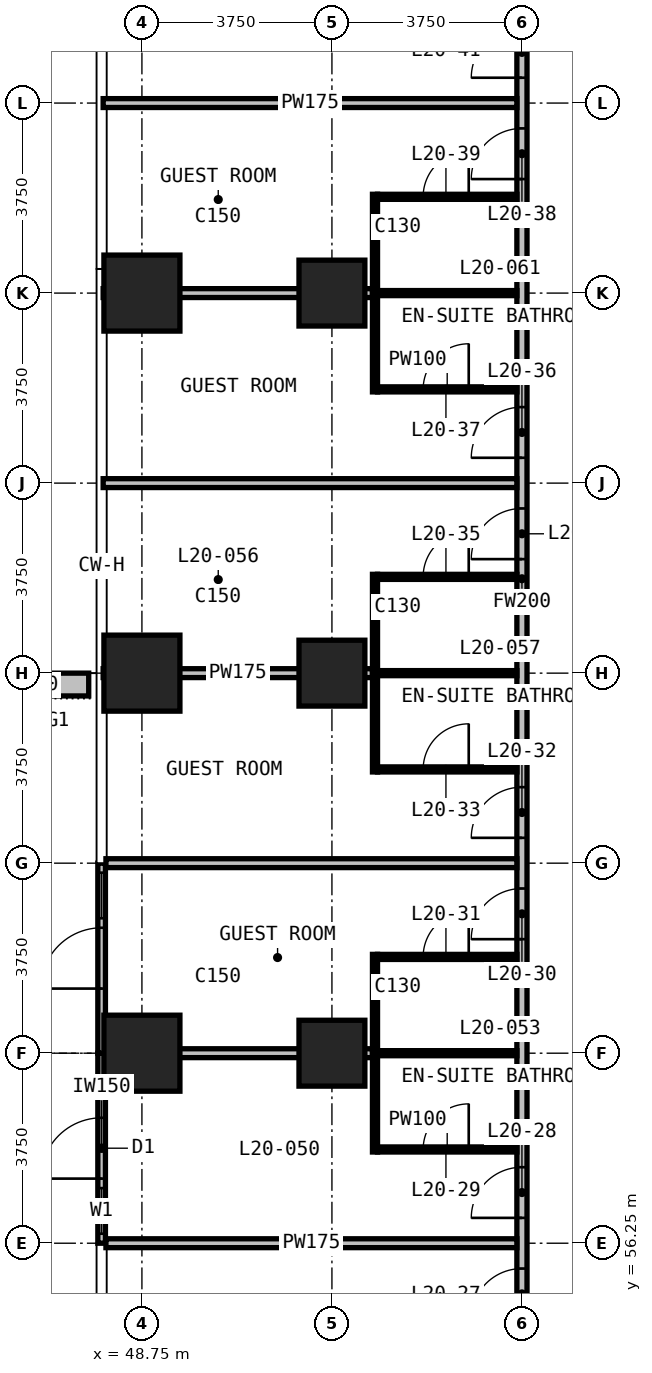
"""IFC4 building model, lengths in metres.
Left out: names, types, materials, properties, quantities, classifications, styles, units other than length and angle.
Written with IfcOpenShell. Run it as: python <this file> out.ifc"""

import sys

from ifc_helpers import new_model, si_unit, direction, frame, frame_2d, origin, origin_2d, place, context, subcontext, project, spatial, rectangle, extrude, element, fill, save


model = new_model("IFC4")
c1 = context("Model", 3, precision=1e-05, world=origin(), true_north=direction((0.0, 1.0)))
c2 = subcontext(c1, "Body", "Model", "MODEL_VIEW")
j1 = project(units=[si_unit("LENGTHUNIT", "METRE"), si_unit("PLANEANGLEUNIT", "RADIAN")], contexts=[c1])
p1 = place(None, origin())
s1 = spatial("IfcSite", under=j1, at=p1, CompositionType="ELEMENT")
p2 = place(p1, origin())
s2 = spatial("IfcBuilding", under=s1, at=p2, CompositionType="ELEMENT")
p3 = place(p2, frame((0.0, 0.0, 85.7)))
s3 = spatial("IfcBuildingStorey", under=s2, at=p3, CompositionType="ELEMENT", Elevation=85.7)
for number, where, z_axis, x_axis in (
    (1, (48.75, 60.0, 0.0), (0.0, 0.0, 1.0), (1.0, 0.0, 0.0)),
    (2, (48.75, 67.5, 0.0), (0.0, 0.0, 1.0), (1.0, 0.0, 0.0)),
    (3, (48.75, 75.0, 0.0), (0.0, 0.0, 1.0), (1.0, 0.0, 0.0)),
):
    element("IfcColumn", number, at=place(p3, frame(where, z_axis=z_axis, x_axis=x_axis)), inside=s3, PredefinedType="COLUMN", context=c2, shape_type="SweptSolid", body=[
        extrude(rectangle(XDim=1.5, YDim=1.5, at=origin_2d()), origin(), (0.0, 0.0, 1.0), 3.3),
    ])
for number, where, z_axis, x_axis in (
    (4, (52.5, 60.0, 0.0), (0.0, 0.0, 1.0), (1.0, 0.0, 0.0)),
    (5, (52.5, 67.5, 0.0), (0.0, 0.0, 1.0), (1.0, 0.0, 0.0)),
    (6, (52.5, 75.0, 0.0), (0.0, 0.0, 1.0), (1.0, 0.0, 0.0)),
):
    element("IfcColumn", number, at=place(p3, frame(where, z_axis=z_axis, x_axis=x_axis)), inside=s3, PredefinedType="COLUMN", context=c2, shape_type="SweptSolid", body=[
        extrude(rectangle(XDim=1.3, YDim=1.3, at=origin_2d()), origin(), (0.0, 0.0, 1.0), 3.3),
    ])
p4 = place(p3, frame((47.955, 56.25, 0.0), z_axis=(0.0, 0.0, 1.0), x_axis=(0.0, 1.0, 0.0)))
e7 = element("IfcWall", 7, at=p4, inside=s3, PredefinedType="SOLIDWALL", context=c2, shape_type="SweptSolid", body=[
    extrude(rectangle(XDim=3.75, YDim=0.15, at=frame_2d((1.875, 0.0))), origin(), (0.0, 0.0, 1.0), 3.0),
])
p5 = place(p4, frame((0.188, 0.0, 0.1)))
e8 = element("IfcOpeningElement", 8, at=p5, cuts=e7, PredefinedType="OPENING", context=c2, shape_type="SweptSolid", body=[
    extrude(rectangle(XDim=0.9, YDim=2.4, at=frame_2d((0.45, 1.2))), frame((0.0, 0.085, 0.0), z_axis=(0.0, -1.0, 0.0), x_axis=(1.0, 0.0, 0.0)), (0.0, 0.0, 1.0), 0.17),
])
p6 = place(p4, frame((1.275, 0.0, 0.0)))
e9 = element("IfcOpeningElement", 9, at=p6, cuts=e7, PredefinedType="OPENING", context=c2, shape_type="SweptSolid", body=[
    extrude(rectangle(XDim=1.2, YDim=2.4, at=frame_2d((0.6, 1.2))), frame((0.0, 0.085, 0.0), z_axis=(0.0, -1.0, 0.0), x_axis=(1.0, 0.0, 0.0)), (0.0, 0.0, 1.0), 0.17),
])
p7 = place(p3, frame((47.955, 60.0, 0.0), z_axis=(0.0, 0.0, 1.0), x_axis=(0.0, 1.0, 0.0)))
e10 = element("IfcWall", 10, at=p7, inside=s3, PredefinedType="SOLIDWALL", context=c2, shape_type="SweptSolid", body=[
    extrude(rectangle(XDim=3.75, YDim=0.15, at=frame_2d((1.875, 0.0))), origin(), (0.0, 0.0, 1.0), 3.0),
])
p8 = place(p7, frame((1.275, 0.0, 0.0)))
e11 = element("IfcOpeningElement", 11, at=p8, cuts=e10, PredefinedType="OPENING", context=c2, shape_type="SweptSolid", body=[
    extrude(rectangle(XDim=1.2, YDim=2.4, at=frame_2d((0.6, 1.2))), frame((0.0, 0.085, 0.0), z_axis=(0.0, -1.0, 0.0), x_axis=(1.0, 0.0, 0.0)), (0.0, 0.0, 1.0), 0.17),
])
p9 = place(p7, frame((2.663, 0.0, 0.1)))
e12 = element("IfcOpeningElement", 12, at=p9, cuts=e10, PredefinedType="OPENING", context=c2, shape_type="SweptSolid", body=[
    extrude(rectangle(XDim=0.9, YDim=2.4, at=frame_2d((0.45, 1.2))), frame((0.0, 0.085, 0.0), z_axis=(0.0, -1.0, 0.0), x_axis=(1.0, 0.0, 0.0)), (0.0, 0.0, 1.0), 0.17),
])
p10 = place(p3, frame((47.7, 67.275, 0.0), z_axis=(0.0, 0.0, 1.0), x_axis=(-1.0, 0.0, 0.0)))
e13 = element("IfcWall", 13, at=p10, inside=s3, PredefinedType="USERDEFINED", context=c2, shape_type="SweptSolid", body=[
    extrude(rectangle(XDim=2.35, YDim=0.45, at=frame_2d((1.175, 0.0))), origin(), (0.0, 0.0, 1.0), 1.1),
])
p11 = place(p3, frame((56.25, 52.4, 0.0), z_axis=(0.0, 0.0, 1.0), x_axis=(0.0, 1.0, 0.0)))
e14 = element("IfcWall", 14, at=p11, inside=s3, PredefinedType="PARTITIONING", context=c2, shape_type="SweptSolid", body=[
    extrude(rectangle(XDim=33.925, YDim=0.2, at=frame_2d((16.962, 0.0))), origin(), (0.0, 0.0, 1.0), 3.0),
])
p12 = place(p11, frame((2.35, 0.0, 0.0)))
e15 = element("IfcOpeningElement", 15, at=p12, cuts=e14, PredefinedType="OPENING", context=c2, shape_type="SweptSolid", body=[
    extrude(rectangle(XDim=1.0, YDim=2.2, at=frame_2d((0.5, 1.1))), frame((0.0, 0.11, 0.0), z_axis=(0.0, -1.0, 0.0), x_axis=(1.0, 0.0, 0.0)), (0.0, 0.0, 1.0), 0.22),
])
p13 = place(p11, frame((4.35, 0.0, 0.0)))
e16 = element("IfcOpeningElement", 16, at=p13, cuts=e14, PredefinedType="OPENING", context=c2, shape_type="SweptSolid", body=[
    extrude(rectangle(XDim=1.0, YDim=2.2, at=frame_2d((0.5, 1.1))), frame((0.0, 0.11, 0.0), z_axis=(0.0, -1.0, 0.0), x_axis=(1.0, 0.0, 0.0)), (0.0, 0.0, 1.0), 0.22),
])
p14 = place(p11, frame((9.85, 0.0, 0.0)))
e17 = element("IfcOpeningElement", 17, at=p14, cuts=e14, PredefinedType="OPENING", context=c2, shape_type="SweptSolid", body=[
    extrude(rectangle(XDim=1.0, YDim=2.2, at=frame_2d((0.5, 1.1))), frame((0.0, 0.11, 0.0), z_axis=(0.0, -1.0, 0.0), x_axis=(1.0, 0.0, 0.0)), (0.0, 0.0, 1.0), 0.22),
])
p15 = place(p11, frame((11.85, 0.0, 0.0)))
e18 = element("IfcOpeningElement", 18, at=p15, cuts=e14, PredefinedType="OPENING", context=c2, shape_type="SweptSolid", body=[
    extrude(rectangle(XDim=1.0, YDim=2.2, at=frame_2d((0.5, 1.1))), frame((0.0, 0.11, 0.0), z_axis=(0.0, -1.0, 0.0), x_axis=(1.0, 0.0, 0.0)), (0.0, 0.0, 1.0), 0.22),
])
p16 = place(p11, frame((17.35, 0.0, 0.0)))
e19 = element("IfcOpeningElement", 19, at=p16, cuts=e14, PredefinedType="OPENING", context=c2, shape_type="SweptSolid", body=[
    extrude(rectangle(XDim=1.0, YDim=2.2, at=frame_2d((0.5, 1.1))), frame((0.0, 0.11, 0.0), z_axis=(0.0, -1.0, 0.0), x_axis=(1.0, 0.0, 0.0)), (0.0, 0.0, 1.0), 0.22),
])
p17 = place(p11, frame((19.35, 0.0, 0.0)))
e20 = element("IfcOpeningElement", 20, at=p17, cuts=e14, PredefinedType="OPENING", context=c2, shape_type="SweptSolid", body=[
    extrude(rectangle(XDim=1.0, YDim=2.2, at=frame_2d((0.5, 1.1))), frame((0.0, 0.11, 0.0), z_axis=(0.0, -1.0, 0.0), x_axis=(1.0, 0.0, 0.0)), (0.0, 0.0, 1.0), 0.22),
])
p18 = place(p11, frame((24.85, 0.0, 0.0)))
e21 = element("IfcOpeningElement", 21, at=p18, cuts=e14, PredefinedType="OPENING", context=c2, shape_type="SweptSolid", body=[
    extrude(rectangle(XDim=1.0, YDim=2.2, at=frame_2d((0.5, 1.1))), frame((0.0, 0.11, 0.0), z_axis=(0.0, -1.0, 0.0), x_axis=(1.0, 0.0, 0.0)), (0.0, 0.0, 1.0), 0.22),
])
p19 = place(p11, frame((26.85, 0.0, 0.0)))
e22 = element("IfcOpeningElement", 22, at=p19, cuts=e14, PredefinedType="OPENING", context=c2, shape_type="SweptSolid", body=[
    extrude(rectangle(XDim=1.0, YDim=2.2, at=frame_2d((0.5, 1.1))), frame((0.0, 0.11, 0.0), z_axis=(0.0, -1.0, 0.0), x_axis=(1.0, 0.0, 0.0)), (0.0, 0.0, 1.0), 0.22),
])
p20 = place(p11, frame((31.55, 0.0, 0.0)))
e23 = element("IfcOpeningElement", 23, at=p20, cuts=e14, PredefinedType="OPENING", context=c2, shape_type="SweptSolid", body=[
    extrude(rectangle(XDim=0.9, YDim=2.2, at=frame_2d((0.45, 1.1))), frame((0.0, 0.11, 0.0), z_axis=(0.0, -1.0, 0.0), x_axis=(1.0, 0.0, 0.0)), (0.0, 0.0, 1.0), 0.22),
])
p21 = place(p3, frame((48.04, 56.25, 0.0), z_axis=(0.0, 0.0, 1.0), x_axis=(1.0, 0.0, 0.0)))
e24 = element("IfcWall", 24, at=p21, inside=s3, PredefinedType="PARTITIONING", context=c2, shape_type="SweptSolid", body=[
    extrude(rectangle(XDim=8.11, YDim=0.175, at=frame_2d((4.055, 0.0))), origin(), (0.0, 0.0, 1.0), 3.0),
])
p22 = place(p3, frame((48.04, 60.0, 0.0), z_axis=(0.0, 0.0, 1.0), x_axis=(1.0, 0.0, 0.0)))
e25 = element("IfcWall", 25, at=p22, inside=s3, PredefinedType="PARTITIONING", context=c2, shape_type="SweptSolid", body=[
    extrude(rectangle(XDim=5.26, YDim=0.175, at=frame_2d((2.63, 0.0))), origin(), (0.0, 0.0, 1.0), 3.0),
])
p23 = place(p3, frame((48.04, 63.75, 0.0), z_axis=(0.0, 0.0, 1.0), x_axis=(1.0, 0.0, 0.0)))
e26 = element("IfcWall", 26, at=p23, inside=s3, PredefinedType="PARTITIONING", context=c2, shape_type="SweptSolid", body=[
    extrude(rectangle(XDim=8.11, YDim=0.175, at=frame_2d((4.055, 0.0))), origin(), (0.0, 0.0, 1.0), 3.0),
])
p24 = place(p3, frame((47.985, 67.5, 0.0), z_axis=(0.0, 0.0, 1.0), x_axis=(1.0, 0.0, 0.0)))
e27 = element("IfcWall", 27, at=p24, inside=s3, PredefinedType="PARTITIONING", context=c2, shape_type="SweptSolid", body=[
    extrude(rectangle(XDim=5.315, YDim=0.175, at=frame_2d((2.657, 0.0))), origin(), (0.0, 0.0, 1.0), 3.0),
])
p25 = place(p3, frame((47.985, 71.25, 0.0), z_axis=(0.0, 0.0, 1.0), x_axis=(1.0, 0.0, 0.0)))
e28 = element("IfcWall", 28, at=p25, inside=s3, PredefinedType="PARTITIONING", context=c2, shape_type="SweptSolid", body=[
    extrude(rectangle(XDim=8.165, YDim=0.175, at=frame_2d((4.083, 0.0))), origin(), (0.0, 0.0, 1.0), 3.0),
])
p26 = place(p3, frame((47.985, 75.0, 0.0), z_axis=(0.0, 0.0, 1.0), x_axis=(1.0, 0.0, 0.0)))
e29 = element("IfcWall", 29, at=p26, inside=s3, PredefinedType="PARTITIONING", context=c2, shape_type="SweptSolid", body=[
    extrude(rectangle(XDim=5.315, YDim=0.175, at=frame_2d((2.657, 0.0))), origin(), (0.0, 0.0, 1.0), 3.0),
])
p27 = place(p3, frame((47.985, 78.75, 0.0), z_axis=(0.0, 0.0, 1.0), x_axis=(1.0, 0.0, 0.0)))
e30 = element("IfcWall", 30, at=p27, inside=s3, PredefinedType="PARTITIONING", context=c2, shape_type="SweptSolid", body=[
    extrude(rectangle(XDim=8.165, YDim=0.175, at=frame_2d((4.083, 0.0))), origin(), (0.0, 0.0, 1.0), 3.0),
])
p28 = place(p3, frame((53.4, 58.1, 0.0), z_axis=(0.0, 0.0, 1.0), x_axis=(1.0, 0.0, 0.0)))
e31 = element("IfcWall", 31, at=p28, inside=s3, PredefinedType="PARTITIONING", context=c2, shape_type="SweptSolid", body=[
    extrude(rectangle(XDim=2.75, YDim=0.1, at=frame_2d((1.375, 0.0))), origin(), (0.0, 0.0, 1.0), 3.0),
])
p29 = place(p28, frame((0.9, 0.0, 0.0)))
e32 = element("IfcOpeningElement", 32, at=p29, cuts=e31, PredefinedType="OPENING", context=c2, shape_type="SweptSolid", body=[
    extrude(rectangle(XDim=0.9, YDim=2.2, at=frame_2d((0.45, 1.1))), frame((0.0, 0.06, 0.0), z_axis=(0.0, -1.0, 0.0), x_axis=(1.0, 0.0, 0.0)), (0.0, 0.0, 1.0), 0.12),
])
p30 = place(p3, frame((53.4, 60.0, 0.0), z_axis=(0.0, 0.0, 1.0), x_axis=(1.0, 0.0, 0.0)))
e33 = element("IfcWall", 33, at=p30, inside=s3, PredefinedType="PARTITIONING", context=c2, shape_type="SweptSolid", body=[
    extrude(rectangle(XDim=2.75, YDim=0.1, at=frame_2d((1.375, 0.0))), origin(), (0.0, 0.0, 1.0), 3.0),
])
p31 = place(p3, frame((53.4, 61.9, 0.0), z_axis=(0.0, 0.0, 1.0), x_axis=(1.0, 0.0, 0.0)))
e34 = element("IfcWall", 34, at=p31, inside=s3, PredefinedType="PARTITIONING", context=c2, shape_type="SweptSolid", body=[
    extrude(rectangle(XDim=2.75, YDim=0.1, at=frame_2d((1.375, 0.0))), origin(), (0.0, 0.0, 1.0), 3.0),
])
p32 = place(p31, frame((0.9, 0.0, 0.0)))
e35 = element("IfcOpeningElement", 35, at=p32, cuts=e34, PredefinedType="OPENING", context=c2, shape_type="SweptSolid", body=[
    extrude(rectangle(XDim=0.9, YDim=2.2, at=frame_2d((0.45, 1.1))), frame((0.0, 0.06, 0.0), z_axis=(0.0, -1.0, 0.0), x_axis=(1.0, 0.0, 0.0)), (0.0, 0.0, 1.0), 0.12),
])
p33 = place(p3, frame((53.4, 65.6, 0.0), z_axis=(0.0, 0.0, 1.0), x_axis=(1.0, 0.0, 0.0)))
e36 = element("IfcWall", 36, at=p33, inside=s3, PredefinedType="PARTITIONING", context=c2, shape_type="SweptSolid", body=[
    extrude(rectangle(XDim=2.75, YDim=0.1, at=frame_2d((1.375, 0.0))), origin(), (0.0, 0.0, 1.0), 3.0),
])
p34 = place(p33, frame((0.9, 0.0, 0.0)))
e37 = element("IfcOpeningElement", 37, at=p34, cuts=e36, PredefinedType="OPENING", context=c2, shape_type="SweptSolid", body=[
    extrude(rectangle(XDim=0.9, YDim=2.2, at=frame_2d((0.45, 1.1))), frame((0.0, 0.06, 0.0), z_axis=(0.0, -1.0, 0.0), x_axis=(1.0, 0.0, 0.0)), (0.0, 0.0, 1.0), 0.12),
])
p35 = place(p3, frame((53.4, 67.5, 0.0), z_axis=(0.0, 0.0, 1.0), x_axis=(1.0, 0.0, 0.0)))
e38 = element("IfcWall", 38, at=p35, inside=s3, PredefinedType="PARTITIONING", context=c2, shape_type="SweptSolid", body=[
    extrude(rectangle(XDim=2.75, YDim=0.1, at=frame_2d((1.375, 0.0))), origin(), (0.0, 0.0, 1.0), 3.0),
])
p36 = place(p3, frame((53.4, 69.4, 0.0), z_axis=(0.0, 0.0, 1.0), x_axis=(1.0, 0.0, 0.0)))
e39 = element("IfcWall", 39, at=p36, inside=s3, PredefinedType="PARTITIONING", context=c2, shape_type="SweptSolid", body=[
    extrude(rectangle(XDim=2.75, YDim=0.1, at=frame_2d((1.375, 0.0))), origin(), (0.0, 0.0, 1.0), 3.0),
])
p37 = place(p36, frame((0.9, 0.0, 0.0)))
e40 = element("IfcOpeningElement", 40, at=p37, cuts=e39, PredefinedType="OPENING", context=c2, shape_type="SweptSolid", body=[
    extrude(rectangle(XDim=0.9, YDim=2.2, at=frame_2d((0.45, 1.1))), frame((0.0, 0.06, 0.0), z_axis=(0.0, -1.0, 0.0), x_axis=(1.0, 0.0, 0.0)), (0.0, 0.0, 1.0), 0.12),
])
p38 = place(p3, frame((53.4, 73.1, 0.0), z_axis=(0.0, 0.0, 1.0), x_axis=(1.0, 0.0, 0.0)))
e41 = element("IfcWall", 41, at=p38, inside=s3, PredefinedType="PARTITIONING", context=c2, shape_type="SweptSolid", body=[
    extrude(rectangle(XDim=2.75, YDim=0.1, at=frame_2d((1.375, 0.0))), origin(), (0.0, 0.0, 1.0), 3.0),
])
p39 = place(p38, frame((0.9, 0.0, 0.0)))
e42 = element("IfcOpeningElement", 42, at=p39, cuts=e41, PredefinedType="OPENING", context=c2, shape_type="SweptSolid", body=[
    extrude(rectangle(XDim=0.9, YDim=2.2, at=frame_2d((0.45, 1.1))), frame((0.0, 0.06, 0.0), z_axis=(0.0, -1.0, 0.0), x_axis=(1.0, 0.0, 0.0)), (0.0, 0.0, 1.0), 0.12),
])
p40 = place(p3, frame((53.4, 75.0, 0.0), z_axis=(0.0, 0.0, 1.0), x_axis=(1.0, 0.0, 0.0)))
e43 = element("IfcWall", 43, at=p40, inside=s3, PredefinedType="PARTITIONING", context=c2, shape_type="SweptSolid", body=[
    extrude(rectangle(XDim=2.75, YDim=0.1, at=frame_2d((1.375, 0.0))), origin(), (0.0, 0.0, 1.0), 3.0),
])
p41 = place(p3, frame((53.4, 76.9, 0.0), z_axis=(0.0, 0.0, 1.0), x_axis=(1.0, 0.0, 0.0)))
e44 = element("IfcWall", 44, at=p41, inside=s3, PredefinedType="PARTITIONING", context=c2, shape_type="SweptSolid", body=[
    extrude(rectangle(XDim=2.75, YDim=0.1, at=frame_2d((1.375, 0.0))), origin(), (0.0, 0.0, 1.0), 3.0),
])
p42 = place(p41, frame((0.9, 0.0, 0.0)))
e45 = element("IfcOpeningElement", 45, at=p42, cuts=e44, PredefinedType="OPENING", context=c2, shape_type="SweptSolid", body=[
    extrude(rectangle(XDim=0.9, YDim=2.2, at=frame_2d((0.45, 1.1))), frame((0.0, 0.06, 0.0), z_axis=(0.0, -1.0, 0.0), x_axis=(1.0, 0.0, 0.0)), (0.0, 0.0, 1.0), 0.12),
])
for number, where, z_axis, x_axis in (
    (46, (53.35, 58.05, 0.0), (0.0, 0.0, 1.0), (0.0, 1.0, 0.0)),
    (47, (53.35, 65.55, 0.0), (0.0, 0.0, 1.0), (0.0, 1.0, 0.0)),
    (48, (53.35, 73.05, 0.0), (0.0, 0.0, 1.0), (0.0, 1.0, 0.0)),
):
    element("IfcWall", number, at=place(p3, frame(where, z_axis=z_axis, x_axis=x_axis)), inside=s3, PredefinedType="PARTITIONING", context=c2, shape_type="SweptSolid", body=[
        extrude(rectangle(XDim=3.9, YDim=0.1, at=frame_2d((1.95, 0.0))), origin(), (0.0, 0.0, 1.0), 3.0),
    ])
p43 = place(p5, origin())
e49 = element("IfcWindow", 49, at=p43, inside=s3, PartitioningType="SINGLE_PANEL", PredefinedType="WINDOW", context=c2, shape_type="SweptSolid", body=[
    extrude(rectangle(XDim=0.9, YDim=2.4, at=frame_2d((0.45, 1.2))), frame((0.0, 0.03, 0.0), z_axis=(0.0, -1.0, 0.0), x_axis=(1.0, 0.0, 0.0)), (0.0, 0.0, 1.0), 0.06),
])
fill(e8, e49)
p44 = place(p6, origin())
e50 = element("IfcDoor", 50, at=p44, inside=s3, OperationType="SINGLE_SWING_LEFT", PredefinedType="DOOR", context=c2, shape_type="SweptSolid", body=[
    extrude(rectangle(XDim=1.2, YDim=2.4, at=frame_2d((0.6, 1.2))), frame((0.0, 0.025, 0.0), z_axis=(0.0, -1.0, 0.0), x_axis=(1.0, 0.0, 0.0)), (0.0, 0.0, 1.0), 0.05),
])
fill(e9, e50)
p45 = place(p8, origin())
e51 = element("IfcDoor", 51, at=p45, inside=s3, OperationType="SINGLE_SWING_LEFT", PredefinedType="DOOR", context=c2, shape_type="SweptSolid", body=[
    extrude(rectangle(XDim=1.2, YDim=2.4, at=frame_2d((0.6, 1.2))), frame((0.0, 0.025, 0.0), z_axis=(0.0, -1.0, 0.0), x_axis=(1.0, 0.0, 0.0)), (0.0, 0.0, 1.0), 0.05),
])
fill(e11, e51)
p46 = place(p9, origin())
e52 = element("IfcWindow", 52, at=p46, inside=s3, PartitioningType="SINGLE_PANEL", PredefinedType="WINDOW", context=c2, shape_type="SweptSolid", body=[
    extrude(rectangle(XDim=0.9, YDim=2.4, at=frame_2d((0.45, 1.2))), frame((0.0, 0.03, 0.0), z_axis=(0.0, -1.0, 0.0), x_axis=(1.0, 0.0, 0.0)), (0.0, 0.0, 1.0), 0.06),
])
fill(e12, e52)
p47 = place(p12, origin())
e53 = element("IfcDoor", 53, at=p47, inside=s3, OperationType="SINGLE_SWING_RIGHT", PredefinedType="DOOR", context=c2, shape_type="SweptSolid", body=[
    extrude(rectangle(XDim=1.0, YDim=2.2, at=frame_2d((0.5, 1.1))), frame((0.0, 0.025, 0.0), z_axis=(0.0, -1.0, 0.0), x_axis=(1.0, 0.0, 0.0)), (0.0, 0.0, 1.0), 0.05),
])
fill(e15, e53)
p48 = place(p13, origin())
e54 = element("IfcDoor", 54, at=p48, inside=s3, OperationType="SINGLE_SWING_LEFT", PredefinedType="DOOR", context=c2, shape_type="SweptSolid", body=[
    extrude(rectangle(XDim=1.0, YDim=2.2, at=frame_2d((0.5, 1.1))), frame((0.0, 0.025, 0.0), z_axis=(0.0, -1.0, 0.0), x_axis=(1.0, 0.0, 0.0)), (0.0, 0.0, 1.0), 0.05),
])
fill(e16, e54)
p49 = place(p29, origin())
e55 = element("IfcDoor", 55, at=p49, inside=s3, OperationType="SINGLE_SWING_RIGHT", PredefinedType="DOOR", context=c2, shape_type="SweptSolid", body=[
    extrude(rectangle(XDim=0.9, YDim=2.2, at=frame_2d((0.45, 1.1))), frame((0.0, 0.025, 0.0), z_axis=(0.0, -1.0, 0.0), x_axis=(1.0, 0.0, 0.0)), (0.0, 0.0, 1.0), 0.05),
])
fill(e32, e55)
p50 = place(p14, origin())
e56 = element("IfcDoor", 56, at=p50, inside=s3, OperationType="SINGLE_SWING_LEFT", PredefinedType="DOOR", context=c2, shape_type="SweptSolid", body=[
    extrude(rectangle(XDim=1.0, YDim=2.2, at=frame_2d((0.5, 1.1))), frame((0.0, 0.025, 0.0), z_axis=(0.0, -1.0, 0.0), x_axis=(1.0, 0.0, 0.0)), (0.0, 0.0, 1.0), 0.05),
])
fill(e17, e56)
p51 = place(p32, origin())
e57 = element("IfcDoor", 57, at=p51, inside=s3, OperationType="SINGLE_SWING_RIGHT", PredefinedType="DOOR", context=c2, shape_type="SweptSolid", body=[
    extrude(rectangle(XDim=0.9, YDim=2.2, at=frame_2d((0.45, 1.1))), frame((0.0, 0.025, 0.0), z_axis=(0.0, -1.0, 0.0), x_axis=(1.0, 0.0, 0.0)), (0.0, 0.0, 1.0), 0.05),
])
fill(e35, e57)
p52 = place(p15, origin())
e58 = element("IfcDoor", 58, at=p52, inside=s3, OperationType="SINGLE_SWING_LEFT", PredefinedType="DOOR", context=c2, shape_type="SweptSolid", body=[
    extrude(rectangle(XDim=1.0, YDim=2.2, at=frame_2d((0.5, 1.1))), frame((0.0, 0.025, 0.0), z_axis=(0.0, -1.0, 0.0), x_axis=(1.0, 0.0, 0.0)), (0.0, 0.0, 1.0), 0.05),
])
fill(e18, e58)
p53 = place(p34, origin())
e59 = element("IfcDoor", 59, at=p53, inside=s3, OperationType="SINGLE_SWING_RIGHT", PredefinedType="DOOR", context=c2, shape_type="SweptSolid", body=[
    extrude(rectangle(XDim=0.9, YDim=2.2, at=frame_2d((0.45, 1.1))), frame((0.0, 0.025, 0.0), z_axis=(0.0, -1.0, 0.0), x_axis=(1.0, 0.0, 0.0)), (0.0, 0.0, 1.0), 0.05),
])
fill(e37, e59)
p54 = place(p16, origin())
e60 = element("IfcDoor", 60, at=p54, inside=s3, OperationType="SINGLE_SWING_LEFT", PredefinedType="DOOR", context=c2, shape_type="SweptSolid", body=[
    extrude(rectangle(XDim=1.0, YDim=2.2, at=frame_2d((0.5, 1.1))), frame((0.0, 0.025, 0.0), z_axis=(0.0, -1.0, 0.0), x_axis=(1.0, 0.0, 0.0)), (0.0, 0.0, 1.0), 0.05),
])
fill(e19, e60)
p55 = place(p37, origin())
e61 = element("IfcDoor", 61, at=p55, inside=s3, OperationType="SINGLE_SWING_RIGHT", PredefinedType="DOOR", context=c2, shape_type="SweptSolid", body=[
    extrude(rectangle(XDim=0.9, YDim=2.2, at=frame_2d((0.45, 1.1))), frame((0.0, 0.025, 0.0), z_axis=(0.0, -1.0, 0.0), x_axis=(1.0, 0.0, 0.0)), (0.0, 0.0, 1.0), 0.05),
])
fill(e40, e61)
p56 = place(p17, origin())
e62 = element("IfcDoor", 62, at=p56, inside=s3, OperationType="SINGLE_SWING_LEFT", PredefinedType="DOOR", context=c2, shape_type="SweptSolid", body=[
    extrude(rectangle(XDim=1.0, YDim=2.2, at=frame_2d((0.5, 1.1))), frame((0.0, 0.025, 0.0), z_axis=(0.0, -1.0, 0.0), x_axis=(1.0, 0.0, 0.0)), (0.0, 0.0, 1.0), 0.05),
])
fill(e20, e62)
p57 = place(p39, origin())
e63 = element("IfcDoor", 63, at=p57, inside=s3, OperationType="SINGLE_SWING_RIGHT", PredefinedType="DOOR", context=c2, shape_type="SweptSolid", body=[
    extrude(rectangle(XDim=0.9, YDim=2.2, at=frame_2d((0.45, 1.1))), frame((0.0, 0.025, 0.0), z_axis=(0.0, -1.0, 0.0), x_axis=(1.0, 0.0, 0.0)), (0.0, 0.0, 1.0), 0.05),
])
fill(e42, e63)
p58 = place(p18, origin())
e64 = element("IfcDoor", 64, at=p58, inside=s3, OperationType="SINGLE_SWING_LEFT", PredefinedType="DOOR", context=c2, shape_type="SweptSolid", body=[
    extrude(rectangle(XDim=1.0, YDim=2.2, at=frame_2d((0.5, 1.1))), frame((0.0, 0.025, 0.0), z_axis=(0.0, -1.0, 0.0), x_axis=(1.0, 0.0, 0.0)), (0.0, 0.0, 1.0), 0.05),
])
fill(e21, e64)
p59 = place(p42, origin())
e65 = element("IfcDoor", 65, at=p59, inside=s3, OperationType="SINGLE_SWING_RIGHT", PredefinedType="DOOR", context=c2, shape_type="SweptSolid", body=[
    extrude(rectangle(XDim=0.9, YDim=2.2, at=frame_2d((0.45, 1.1))), frame((0.0, 0.025, 0.0), z_axis=(0.0, -1.0, 0.0), x_axis=(1.0, 0.0, 0.0)), (0.0, 0.0, 1.0), 0.05),
])
fill(e45, e65)
p60 = place(p19, origin())
e66 = element("IfcDoor", 66, at=p60, inside=s3, OperationType="SINGLE_SWING_RIGHT", PredefinedType="DOOR", context=c2, shape_type="SweptSolid", body=[
    extrude(rectangle(XDim=1.0, YDim=2.2, at=frame_2d((0.5, 1.1))), frame((0.0, 0.025, 0.0), z_axis=(0.0, -1.0, 0.0), x_axis=(1.0, 0.0, 0.0)), (0.0, 0.0, 1.0), 0.05),
])
fill(e22, e66)
save(model, sys.argv[1])
